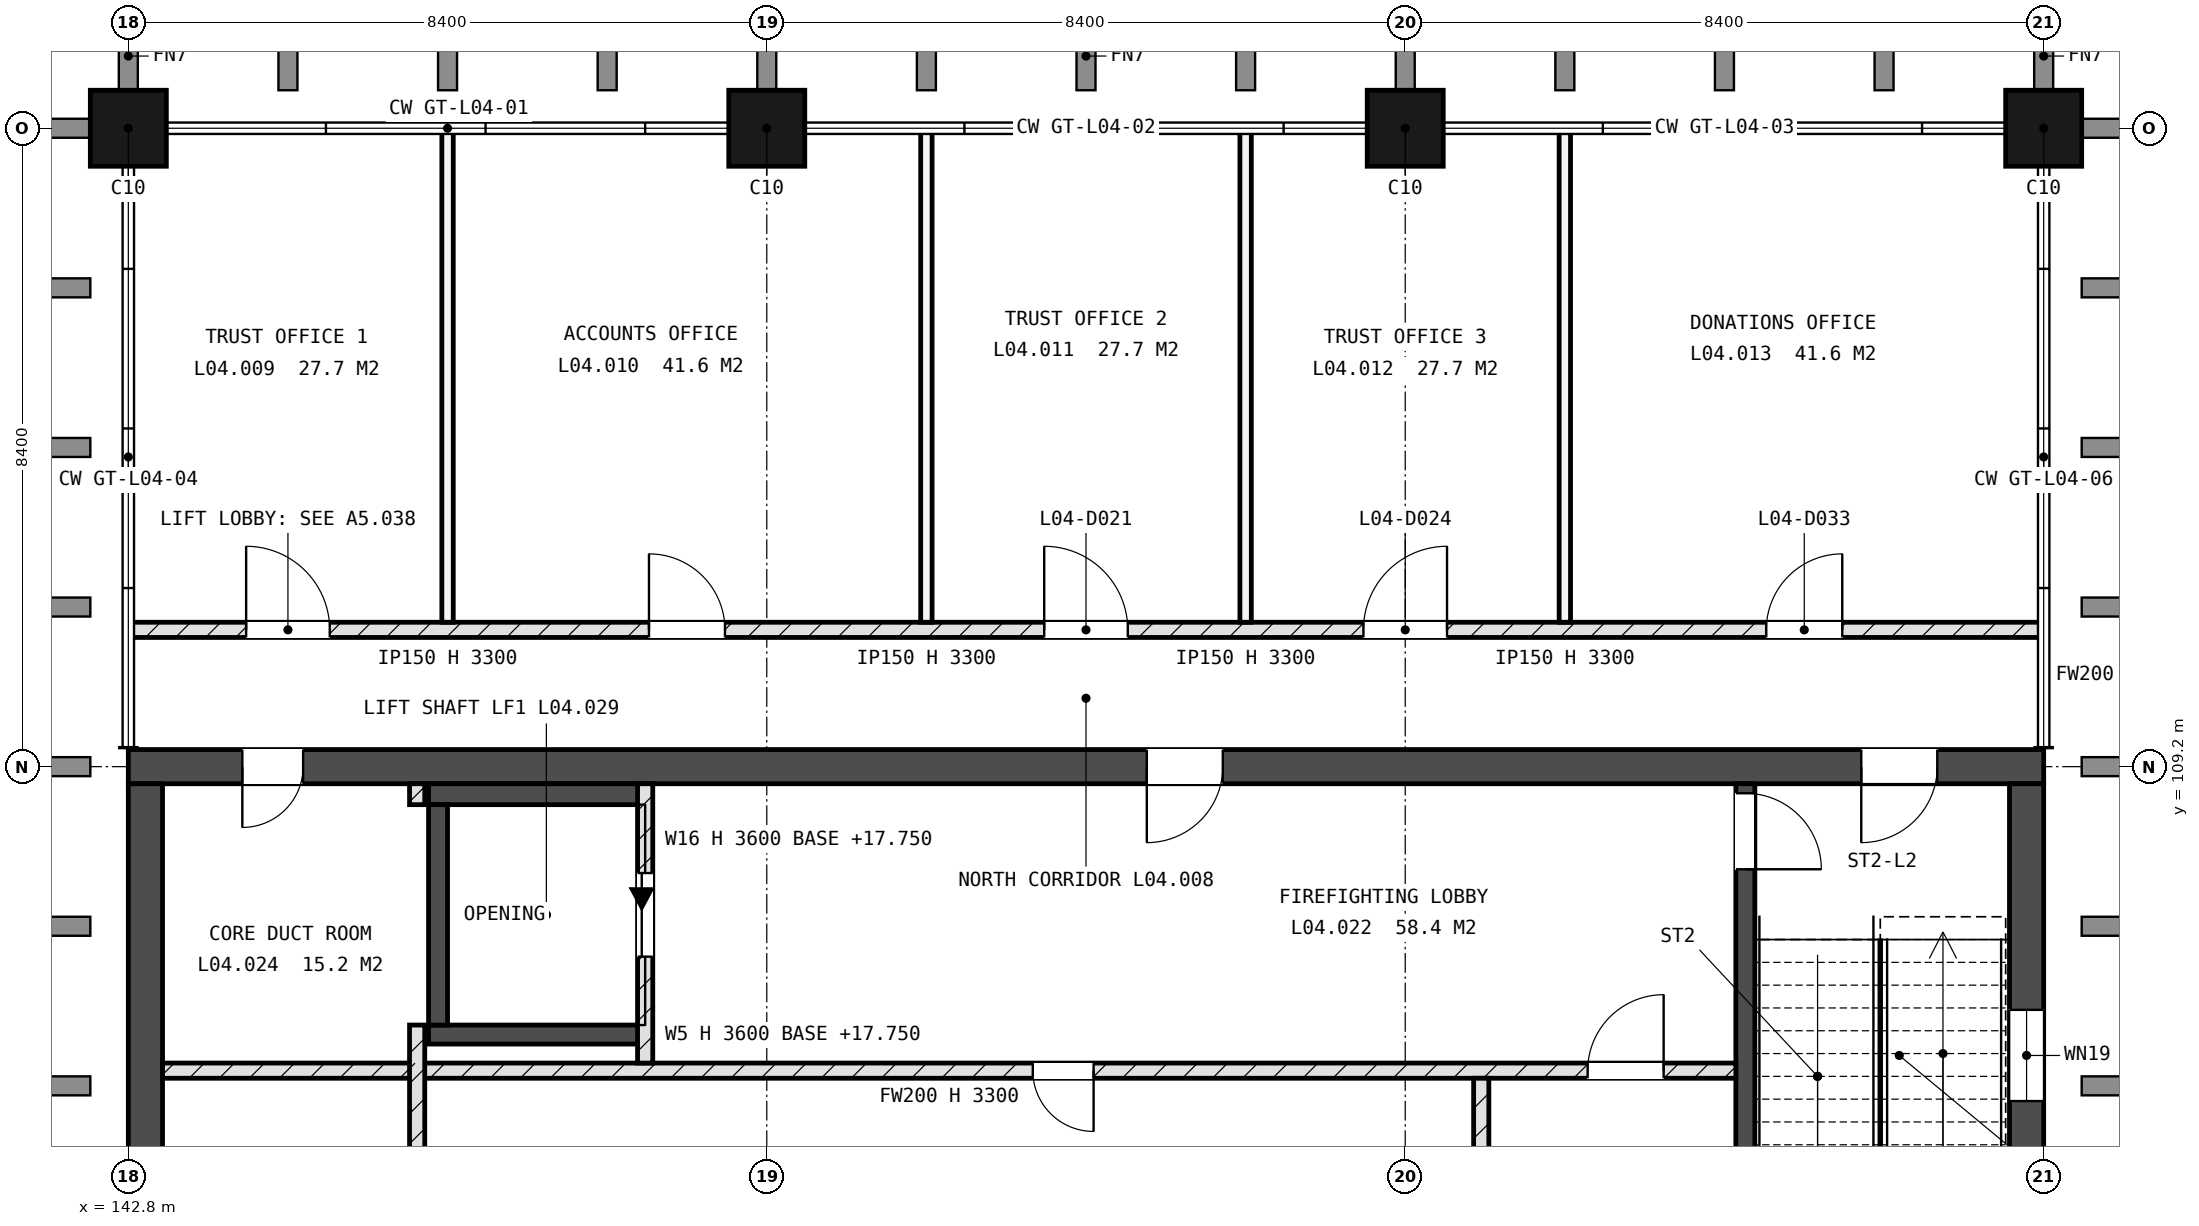
"""IFC4 building model, lengths in metres.
Left out: names, types, materials, properties, quantities, classifications, styles, units other than length and angle.
Written with IfcOpenShell. Run it as: python <this file> out.ifc"""

import sys

from ifc_helpers import new_model, si_unit, direction, frame, frame_2d, origin, origin_2d, place, context, subcontext, project, spatial, rectangle, extrude, element, fill, save


model = new_model("IFC4")
c1 = context("Model", 3, precision=1e-05, world=origin(), true_north=direction((0.0, 1.0)))
c2 = subcontext(c1, "Body", "Model", "MODEL_VIEW")
j1 = project(units=[si_unit("LENGTHUNIT", "METRE"), si_unit("PLANEANGLEUNIT", "RADIAN")], contexts=[c1])
p1 = place(None, origin())
s1 = spatial("IfcSite", under=j1, at=p1, CompositionType="ELEMENT")
p2 = place(p1, origin())
s2 = spatial("IfcBuilding", under=s1, at=p2, CompositionType="ELEMENT")
p3 = place(p2, frame((0.0, 0.0, 18.0)))
s3 = spatial("IfcBuildingStorey", under=s2, at=p3, CompositionType="ELEMENT", Elevation=18.0)
for number, where, z_axis, x_axis in (
    (1, (142.8, 117.6, -0.25), (0.0, 0.0, 1.0), (1.0, 0.0, 0.0)),
    (2, (151.2, 117.6, -0.25), (0.0, 0.0, 1.0), (1.0, 0.0, 0.0)),
    (3, (159.6, 117.6, -0.25), (0.0, 0.0, 1.0), (1.0, 0.0, 0.0)),
    (4, (168.0, 117.6, -0.25), (0.0, 0.0, 1.0), (1.0, 0.0, 0.0)),
):
    element("IfcColumn", number, at=place(p3, frame(where, z_axis=z_axis, x_axis=x_axis)), inside=s3, PredefinedType="COLUMN", context=c2, shape_type="SweptSolid", body=[
        extrude(rectangle(XDim=1.0, YDim=1.0, at=origin_2d()), origin(), (0.0, 0.0, 1.0), 3.6),
    ])
p4 = place(p3, frame((142.8, 109.2, -0.25), z_axis=(0.0, 0.0, 1.0), x_axis=(1.0, 0.0, 0.0)))
e5 = element("IfcWall", 5, at=p4, inside=s3, PredefinedType="SHEAR", context=c2, shape_type="SweptSolid", body=[
    extrude(rectangle(XDim=25.2, YDim=0.45, at=frame_2d((12.6, 0.0))), origin(), (0.0, 0.0, 1.0), 3.6),
])
p5 = place(p4, frame((22.8, 0.0, 0.25)))
e6 = element("IfcOpeningElement", 6, at=p5, cuts=e5, PredefinedType="OPENING", context=c2, shape_type="SweptSolid", body=[
    extrude(rectangle(XDim=1.0, YDim=2.1, at=frame_2d((0.5, 1.05))), frame((0.0, 0.235, 0.0), z_axis=(0.0, -1.0, 0.0), x_axis=(1.0, 0.0, 0.0)), (0.0, 0.0, 1.0), 0.47),
])
p6 = place(p4, frame((1.5, 0.0, 0.25)))
e7 = element("IfcOpeningElement", 7, at=p6, cuts=e5, PredefinedType="OPENING", context=c2, shape_type="SweptSolid", body=[
    extrude(rectangle(XDim=0.8, YDim=2.1, at=frame_2d((0.4, 1.05))), frame((0.0, 0.235, 0.0), z_axis=(0.0, -1.0, 0.0), x_axis=(1.0, 0.0, 0.0)), (0.0, 0.0, 1.0), 0.47),
])
p7 = place(p4, frame((13.4, 0.0, 0.25)))
e8 = element("IfcOpeningElement", 8, at=p7, cuts=e5, PredefinedType="OPENING", context=c2, shape_type="SweptSolid", body=[
    extrude(rectangle(XDim=1.0, YDim=2.1, at=frame_2d((0.5, 1.05))), frame((0.0, 0.235, 0.0), z_axis=(0.0, -1.0, 0.0), x_axis=(1.0, 0.0, 0.0)), (0.0, 0.0, 1.0), 0.47),
])
p8 = place(p3, frame((143.025, 92.625, -0.25), z_axis=(0.0, 0.0, 1.0), x_axis=(0.0, 1.0, 0.0)))
e9 = element("IfcWall", 9, at=p8, inside=s3, PredefinedType="SHEAR", context=c2, shape_type="SweptSolid", body=[
    extrude(rectangle(XDim=16.35, YDim=0.45, at=frame_2d((8.175, 0.0))), origin(), (0.0, 0.0, 1.0), 3.6),
])
p9 = place(p8, frame((2.975, 0.0, 1.85)))
e10 = element("IfcOpeningElement", 10, at=p9, cuts=e9, PredefinedType="OPENING", context=c2, shape_type="SweptSolid", body=[
    extrude(rectangle(XDim=1.2, YDim=0.9, at=frame_2d((0.6, 0.45))), frame((0.0, 0.235, 0.0), z_axis=(0.0, -1.0, 0.0), x_axis=(1.0, 0.0, 0.0)), (0.0, 0.0, 1.0), 0.47),
])
p10 = place(p3, frame((167.775, 92.625, -0.25), z_axis=(0.0, 0.0, 1.0), x_axis=(0.0, 1.0, 0.0)))
e11 = element("IfcWall", 11, at=p10, inside=s3, PredefinedType="SHEAR", context=c2, shape_type="SweptSolid", body=[
    extrude(rectangle(XDim=16.35, YDim=0.45, at=frame_2d((8.175, 0.0))), origin(), (0.0, 0.0, 1.0), 3.6),
])
p11 = place(p10, frame((12.175, 0.0, 1.85)))
e12 = element("IfcOpeningElement", 12, at=p11, cuts=e11, PredefinedType="OPENING", context=c2, shape_type="SweptSolid", body=[
    extrude(rectangle(XDim=1.2, YDim=0.9, at=frame_2d((0.6, 0.45))), frame((0.0, 0.235, 0.0), z_axis=(0.0, -1.0, 0.0), x_axis=(1.0, 0.0, 0.0)), (0.0, 0.0, 1.0), 0.47),
])
p12 = place(p3, frame((164.075, 101.35, -0.25), z_axis=(0.0, 0.0, 1.0), x_axis=(0.0, 1.0, 0.0)))
e13 = element("IfcWall", 13, at=p12, inside=s3, PredefinedType="SHEAR", context=c2, shape_type="SweptSolid", body=[
    extrude(rectangle(XDim=7.625, YDim=0.25, at=frame_2d((3.812, 0.0))), origin(), (0.0, 0.0, 1.0), 3.6),
])
p13 = place(p12, frame((6.5, 0.0, 0.25)))
e14 = element("IfcOpeningElement", 14, at=p13, cuts=e13, PredefinedType="OPENING", context=c2, shape_type="SweptSolid", body=[
    extrude(rectangle(XDim=1.0, YDim=2.1, at=frame_2d((0.5, 1.05))), frame((0.0, 0.135, 0.0), z_axis=(0.0, -1.0, 0.0), x_axis=(1.0, 0.0, 0.0)), (0.0, 0.0, 1.0), 0.27),
])
p14 = place(p3, frame((146.75, 105.675, -0.25), z_axis=(0.0, 0.0, 1.0), x_axis=(1.0, 0.0, 0.0)))
e15 = element("IfcWall", 15, at=p14, inside=s3, PredefinedType="SHEAR", context=c2, shape_type="SweptSolid", body=[
    extrude(rectangle(XDim=2.85, YDim=0.25, at=frame_2d((1.425, 0.0))), origin(), (0.0, 0.0, 1.0), 3.6),
])
p15 = place(p3, frame((146.75, 108.837, -0.25), z_axis=(0.0, 0.0, 1.0), x_axis=(1.0, 0.0, 0.0)))
e16 = element("IfcWall", 16, at=p15, inside=s3, PredefinedType="SHEAR", context=c2, shape_type="SweptSolid", body=[
    extrude(rectangle(XDim=2.85, YDim=0.275, at=frame_2d((1.425, 0.0))), origin(), (0.0, 0.0, 1.0), 3.6),
])
p16 = place(p3, frame((146.875, 105.8, -0.25), z_axis=(0.0, 0.0, 1.0), x_axis=(0.0, 1.0, 0.0)))
e17 = element("IfcWall", 17, at=p16, inside=s3, PredefinedType="SHEAR", context=c2, shape_type="SweptSolid", body=[
    extrude(rectangle(XDim=2.9, YDim=0.25, at=frame_2d((1.45, 0.0))), origin(), (0.0, 0.0, 1.0), 3.6),
])
p17 = place(p3, frame((143.25, 105.2, 0.0), z_axis=(0.0, 0.0, 1.0), x_axis=(1.0, 0.0, 0.0)))
e18 = element("IfcWall", 18, at=p17, inside=s3, PredefinedType="SOLIDWALL", context=c2, shape_type="SweptSolid", body=[
    extrude(rectangle(XDim=20.7, YDim=0.2, at=frame_2d((10.35, 0.0))), origin(), (0.0, 0.0, 1.0), 3.3),
])
p18 = place(p17, frame((11.45, 0.0, 0.0)))
e19 = element("IfcOpeningElement", 19, at=p18, cuts=e18, PredefinedType="OPENING", context=c2, shape_type="SweptSolid", body=[
    extrude(rectangle(XDim=0.8, YDim=2.1, at=frame_2d((0.4, 1.05))), frame((0.0, 0.11, 0.0), z_axis=(0.0, -1.0, 0.0), x_axis=(1.0, 0.0, 0.0)), (0.0, 0.0, 1.0), 0.22),
])
p19 = place(p17, frame((18.75, 0.0, 0.0)))
e20 = element("IfcOpeningElement", 20, at=p19, cuts=e18, PredefinedType="OPENING", context=c2, shape_type="SweptSolid", body=[
    extrude(rectangle(XDim=1.0, YDim=2.1, at=frame_2d((0.5, 1.05))), frame((0.0, 0.11, 0.0), z_axis=(0.0, -1.0, 0.0), x_axis=(1.0, 0.0, 0.0)), (0.0, 0.0, 1.0), 0.22),
])
p20 = place(p3, frame((142.8, 111.0, 0.0), z_axis=(0.0, 0.0, 1.0), x_axis=(1.0, 0.0, 0.0)))
e21 = element("IfcWall", 21, at=p20, inside=s3, PredefinedType="SOLIDWALL", context=c2, shape_type="SweptSolid", body=[
    extrude(rectangle(XDim=25.2, YDim=0.2, at=frame_2d((12.6, 0.0))), origin(), (0.0, 0.0, 1.0), 3.3),
])
p21 = place(p20, frame((1.55, 0.0, 0.0)))
e22 = element("IfcOpeningElement", 22, at=p21, cuts=e21, PredefinedType="OPENING", context=c2, shape_type="SweptSolid", body=[
    extrude(rectangle(XDim=1.1, YDim=2.25, at=frame_2d((0.55, 1.125))), frame((0.0, 0.11, 0.0), z_axis=(0.0, -1.0, 0.0), x_axis=(1.0, 0.0, 0.0)), (0.0, 0.0, 1.0), 0.22),
])
p22 = place(p20, frame((6.85, 0.0, 0.0)))
e23 = element("IfcOpeningElement", 23, at=p22, cuts=e21, PredefinedType="OPENING", context=c2, shape_type="SweptSolid", body=[
    extrude(rectangle(XDim=1.0, YDim=2.1, at=frame_2d((0.5, 1.05))), frame((0.0, 0.11, 0.0), z_axis=(0.0, -1.0, 0.0), x_axis=(1.0, 0.0, 0.0)), (0.0, 0.0, 1.0), 0.22),
])
p23 = place(p20, frame((12.05, 0.0, 0.0)))
e24 = element("IfcOpeningElement", 24, at=p23, cuts=e21, PredefinedType="OPENING", context=c2, shape_type="SweptSolid", body=[
    extrude(rectangle(XDim=1.1, YDim=2.25, at=frame_2d((0.55, 1.125))), frame((0.0, 0.11, 0.0), z_axis=(0.0, -1.0, 0.0), x_axis=(1.0, 0.0, 0.0)), (0.0, 0.0, 1.0), 0.22),
])
p24 = place(p20, frame((16.25, 0.0, 0.0)))
e25 = element("IfcOpeningElement", 25, at=p24, cuts=e21, PredefinedType="OPENING", context=c2, shape_type="SweptSolid", body=[
    extrude(rectangle(XDim=1.1, YDim=2.25, at=frame_2d((0.55, 1.125))), frame((0.0, 0.11, 0.0), z_axis=(0.0, -1.0, 0.0), x_axis=(1.0, 0.0, 0.0)), (0.0, 0.0, 1.0), 0.22),
])
p25 = place(p20, frame((21.55, 0.0, 0.0)))
e26 = element("IfcOpeningElement", 26, at=p25, cuts=e21, PredefinedType="OPENING", context=c2, shape_type="SweptSolid", body=[
    extrude(rectangle(XDim=1.0, YDim=2.1, at=frame_2d((0.5, 1.05))), frame((0.0, 0.11, 0.0), z_axis=(0.0, -1.0, 0.0), x_axis=(1.0, 0.0, 0.0)), (0.0, 0.0, 1.0), 0.22),
])
p26 = place(p3, frame((146.6, 100.5, 0.0), z_axis=(0.0, 0.0, 1.0), x_axis=(0.0, 1.0, 0.0)))
e27 = element("IfcWall", 27, at=p26, inside=s3, PredefinedType="SOLIDWALL", context=c2, shape_type="SweptSolid", body=[
    extrude(rectangle(XDim=5.3, YDim=0.2, at=frame_2d((2.65, 0.0))), origin(), (0.0, 0.0, 1.0), 3.3),
])
p27 = place(p26, frame((1.8, 0.0, 0.0)))
e28 = element("IfcOpeningElement", 28, at=p27, cuts=e27, PredefinedType="OPENING", context=c2, shape_type="SweptSolid", body=[
    extrude(rectangle(XDim=1.0, YDim=2.1, at=frame_2d((0.5, 1.05))), frame((0.0, 0.11, 0.0), z_axis=(0.0, -1.0, 0.0), x_axis=(1.0, 0.0, 0.0)), (0.0, 0.0, 1.0), 0.22),
])
p28 = place(p3, frame((146.6, 108.7, 0.0), z_axis=(0.0, 0.0, 1.0), x_axis=(0.0, 1.0, 0.0)))
e29 = element("IfcWall", 29, at=p28, inside=s3, PredefinedType="SOLIDWALL", context=c2, shape_type="SweptSolid", body=[
    extrude(rectangle(XDim=0.275, YDim=0.2, at=frame_2d((0.138, 0.0))), origin(), (0.0, 0.0, 1.0), 3.3),
])
p29 = place(p3, frame((147.0, 111.1, 0.0), z_axis=(0.0, 0.0, 1.0), x_axis=(0.0, 1.0, 0.0)))
e30 = element("IfcWall", 30, at=p29, inside=s3, PredefinedType="PARTITIONING", context=c2, shape_type="SweptSolid", body=[
    extrude(rectangle(XDim=6.5, YDim=0.15, at=frame_2d((3.25, 0.0))), origin(), (0.0, 0.0, 1.0), 3.3),
])
p30 = place(p3, frame((149.6, 105.3, 0.0), z_axis=(0.0, 0.0, 1.0), x_axis=(0.0, 1.0, 0.0)))
e31 = element("IfcWall", 31, at=p30, inside=s3, PredefinedType="SOLIDWALL", context=c2, shape_type="SweptSolid", body=[
    extrude(rectangle(XDim=3.675, YDim=0.2, at=frame_2d((1.837, 0.0))), origin(), (0.0, 0.0, 1.0), 3.3),
])
p31 = place(p30, frame((1.4, 0.0, 0.0)))
e32 = element("IfcOpeningElement", 32, at=p31, cuts=e31, PredefinedType="OPENING", context=c2, shape_type="SweptSolid", body=[
    extrude(rectangle(XDim=1.1, YDim=2.1, at=frame_2d((0.55, 1.05))), frame((0.0, 0.11, 0.0), z_axis=(0.0, -1.0, 0.0), x_axis=(1.0, 0.0, 0.0)), (0.0, 0.0, 1.0), 0.22),
])
for number, where, z_axis, x_axis in (
    (33, (153.3, 111.1, 0.0), (0.0, 0.0, 1.0), (0.0, 1.0, 0.0)),
    (34, (157.5, 111.1, 0.0), (0.0, 0.0, 1.0), (0.0, 1.0, 0.0)),
):
    element("IfcWall", number, at=place(p3, frame(where, z_axis=z_axis, x_axis=x_axis)), inside=s3, PredefinedType="PARTITIONING", context=c2, shape_type="SweptSolid", body=[
        extrude(rectangle(XDim=6.5, YDim=0.15, at=frame_2d((3.25, 0.0))), origin(), (0.0, 0.0, 1.0), 3.3),
    ])
p32 = place(p3, frame((160.6, 92.625, 0.0), z_axis=(0.0, 0.0, 1.0), x_axis=(0.0, 1.0, 0.0)))
e35 = element("IfcWall", 35, at=p32, inside=s3, PredefinedType="SOLIDWALL", context=c2, shape_type="SweptSolid", body=[
    extrude(rectangle(XDim=12.475, YDim=0.2, at=frame_2d((6.238, 0.0))), origin(), (0.0, 0.0, 1.0), 3.3),
])
p33 = place(p32, frame((5.075, 0.0, 0.0)))
e36 = element("IfcOpeningElement", 36, at=p33, cuts=e35, PredefinedType="OPENING", context=c2, shape_type="SweptSolid", body=[
    extrude(rectangle(XDim=0.8, YDim=2.1, at=frame_2d((0.4, 1.05))), frame((0.0, 0.11, 0.0), z_axis=(0.0, -1.0, 0.0), x_axis=(1.0, 0.0, 0.0)), (0.0, 0.0, 1.0), 0.22),
])
p34 = place(p32, frame((0.775, 0.0, 0.0)))
e37 = element("IfcOpeningElement", 37, at=p34, cuts=e35, PredefinedType="OPENING", context=c2, shape_type="SweptSolid", body=[
    extrude(rectangle(XDim=1.0, YDim=2.1, at=frame_2d((0.5, 1.05))), frame((0.0, 0.11, 0.0), z_axis=(0.0, -1.0, 0.0), x_axis=(1.0, 0.0, 0.0)), (0.0, 0.0, 1.0), 0.22),
])
p35 = place(p3, frame((161.7, 111.1, 0.0), z_axis=(0.0, 0.0, 1.0), x_axis=(0.0, 1.0, 0.0)))
e38 = element("IfcWall", 38, at=p35, inside=s3, PredefinedType="PARTITIONING", context=c2, shape_type="SweptSolid", body=[
    extrude(rectangle(XDim=6.5, YDim=0.15, at=frame_2d((3.25, 0.0))), origin(), (0.0, 0.0, 1.0), 3.3),
])
p36 = place(p11, origin())
e39 = element("IfcWindow", 39, at=p36, inside=s3, PartitioningType="SINGLE_PANEL", PredefinedType="WINDOW", context=c2, shape_type="SweptSolid", body=[
    extrude(rectangle(XDim=1.2, YDim=0.9, at=frame_2d((0.6, 0.45))), frame((0.0, 0.03, 0.0), z_axis=(0.0, -1.0, 0.0), x_axis=(1.0, 0.0, 0.0)), (0.0, 0.0, 1.0), 0.06),
])
fill(e12, e39)
p37 = place(p31, origin())
e40 = element("IfcDoor", 40, at=p37, inside=s3, OperationType="SLIDING_TO_LEFT", PredefinedType="DOOR", context=c2, shape_type="SweptSolid", body=[
    extrude(rectangle(XDim=1.1, YDim=2.1, at=frame_2d((0.55, 1.05))), frame((0.0, 0.025, 0.0), z_axis=(0.0, -1.0, 0.0), x_axis=(1.0, 0.0, 0.0)), (0.0, 0.0, 1.0), 0.05),
])
fill(e32, e40)
p38 = place(p13, origin())
e41 = element("IfcDoor", 41, at=p38, inside=s3, OperationType="SINGLE_SWING_LEFT", PredefinedType="DOOR", context=c2, shape_type="SweptSolid", body=[
    extrude(rectangle(XDim=1.0, YDim=2.1, at=frame_2d((0.5, 1.05))), frame((0.0, 0.025, 0.0), z_axis=(0.0, -1.0, 0.0), x_axis=(1.0, 0.0, 0.0)), (0.0, 0.0, 1.0), 0.05),
])
fill(e14, e41)
p39 = place(p5, origin())
e42 = element("IfcDoor", 42, at=p39, inside=s3, OperationType="SINGLE_SWING_LEFT", PredefinedType="DOOR", context=c2, shape_type="SweptSolid", body=[
    extrude(rectangle(XDim=1.0, YDim=2.1, at=frame_2d((0.5, 1.05))), frame((0.0, 0.025, 0.0), z_axis=(0.0, -1.0, 0.0), x_axis=(1.0, 0.0, 0.0)), (0.0, 0.0, 1.0), 0.05),
])
fill(e6, e42)
p40 = place(p21, origin())
e43 = element("IfcDoor", 43, at=p40, inside=s3, OperationType="SINGLE_SWING_RIGHT", PredefinedType="DOOR", context=c2, shape_type="SweptSolid", body=[
    extrude(rectangle(XDim=1.1, YDim=2.25, at=frame_2d((0.55, 1.125))), frame((0.0, 0.025, 0.0), z_axis=(0.0, -1.0, 0.0), x_axis=(1.0, 0.0, 0.0)), (0.0, 0.0, 1.0), 0.05),
])
fill(e22, e43)
p41 = place(p22, origin())
e44 = element("IfcDoor", 44, at=p41, inside=s3, OperationType="SINGLE_SWING_RIGHT", PredefinedType="DOOR", context=c2, shape_type="SweptSolid", body=[
    extrude(rectangle(XDim=1.0, YDim=2.1, at=frame_2d((0.5, 1.05))), frame((0.0, 0.025, 0.0), z_axis=(0.0, -1.0, 0.0), x_axis=(1.0, 0.0, 0.0)), (0.0, 0.0, 1.0), 0.05),
])
fill(e23, e44)
p42 = place(p23, origin())
e45 = element("IfcDoor", 45, at=p42, inside=s3, OperationType="SINGLE_SWING_RIGHT", PredefinedType="DOOR", context=c2, shape_type="SweptSolid", body=[
    extrude(rectangle(XDim=1.1, YDim=2.25, at=frame_2d((0.55, 1.125))), frame((0.0, 0.025, 0.0), z_axis=(0.0, -1.0, 0.0), x_axis=(1.0, 0.0, 0.0)), (0.0, 0.0, 1.0), 0.05),
])
fill(e24, e45)
p43 = place(p24, origin())
e46 = element("IfcDoor", 46, at=p43, inside=s3, OperationType="SINGLE_SWING_LEFT", PredefinedType="DOOR", context=c2, shape_type="SweptSolid", body=[
    extrude(rectangle(XDim=1.1, YDim=2.25, at=frame_2d((0.55, 1.125))), frame((0.0, 0.025, 0.0), z_axis=(0.0, -1.0, 0.0), x_axis=(1.0, 0.0, 0.0)), (0.0, 0.0, 1.0), 0.05),
])
fill(e25, e46)
p44 = place(p25, origin())
e47 = element("IfcDoor", 47, at=p44, inside=s3, OperationType="SINGLE_SWING_LEFT", PredefinedType="DOOR", context=c2, shape_type="SweptSolid", body=[
    extrude(rectangle(XDim=1.0, YDim=2.1, at=frame_2d((0.5, 1.05))), frame((0.0, 0.025, 0.0), z_axis=(0.0, -1.0, 0.0), x_axis=(1.0, 0.0, 0.0)), (0.0, 0.0, 1.0), 0.05),
])
fill(e26, e47)
p45 = place(p18, origin())
e48 = element("IfcDoor", 48, at=p45, inside=s3, OperationType="SINGLE_SWING_RIGHT", PredefinedType="DOOR", context=c2, shape_type="SweptSolid", body=[
    extrude(rectangle(XDim=0.8, YDim=2.1, at=frame_2d((0.4, 1.05))), frame((0.0, 0.025, 0.0), z_axis=(0.0, -1.0, 0.0), x_axis=(1.0, 0.0, 0.0)), (0.0, 0.0, 1.0), 0.05),
])
fill(e19, e48)
p46 = place(p6, origin())
e49 = element("IfcDoor", 49, at=p46, inside=s3, OperationType="SINGLE_SWING_LEFT", PredefinedType="DOOR", context=c2, shape_type="SweptSolid", body=[
    extrude(rectangle(XDim=0.8, YDim=2.1, at=frame_2d((0.4, 1.05))), frame((0.0, 0.025, 0.0), z_axis=(0.0, -1.0, 0.0), x_axis=(1.0, 0.0, 0.0)), (0.0, 0.0, 1.0), 0.05),
])
fill(e7, e49)
p47 = place(p7, origin())
e50 = element("IfcDoor", 50, at=p47, inside=s3, OperationType="SINGLE_SWING_LEFT", PredefinedType="DOOR", context=c2, shape_type="SweptSolid", body=[
    extrude(rectangle(XDim=1.0, YDim=2.1, at=frame_2d((0.5, 1.05))), frame((0.0, 0.025, 0.0), z_axis=(0.0, -1.0, 0.0), x_axis=(1.0, 0.0, 0.0)), (0.0, 0.0, 1.0), 0.05),
])
fill(e8, e50)
p48 = place(p19, origin())
e51 = element("IfcDoor", 51, at=p48, inside=s3, OperationType="SINGLE_SWING_LEFT", PredefinedType="DOOR", context=c2, shape_type="SweptSolid", body=[
    extrude(rectangle(XDim=1.0, YDim=2.1, at=frame_2d((0.5, 1.05))), frame((0.0, 0.025, 0.0), z_axis=(0.0, -1.0, 0.0), x_axis=(1.0, 0.0, 0.0)), (0.0, 0.0, 1.0), 0.05),
])
fill(e20, e51)
save(model, sys.argv[1])
